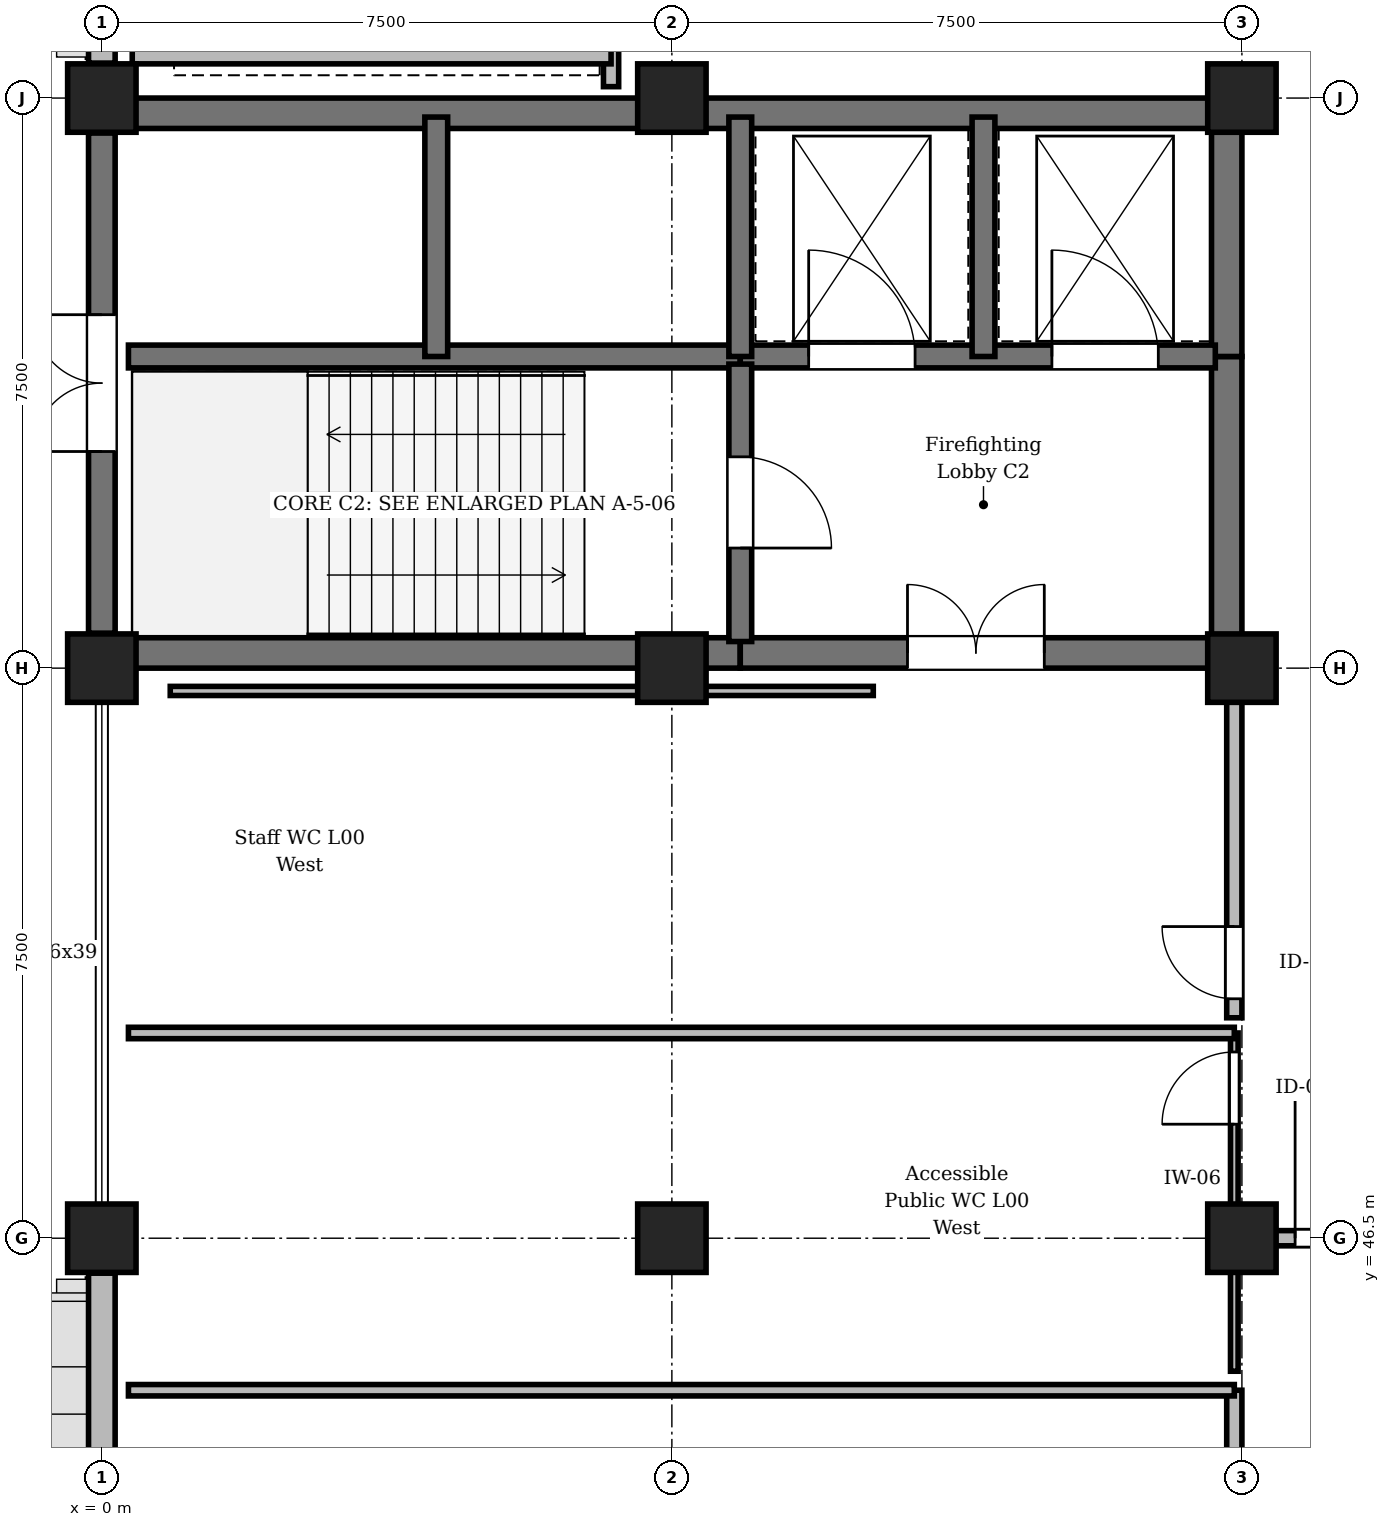
"""IFC4 building model, lengths in metres.
Left out: names, types, materials, properties, quantities, classifications, styles, units other than length and angle.
Written with IfcOpenShell. Run it as: python <this file> out.ifc"""

import sys

from ifc_helpers import new_model, si_unit, direction, frame, frame_2d, origin, origin_2d, place, context, subcontext, project, spatial, rectangle, circle, extrude, element, fill, save


model = new_model("IFC4")
c1 = context("Model", 3, precision=1e-05, world=origin(), true_north=direction((0.0, 1.0)))
c2 = subcontext(c1, "Body", "Model", "MODEL_VIEW")
j1 = project(units=[si_unit("LENGTHUNIT", "METRE"), si_unit("PLANEANGLEUNIT", "RADIAN")], contexts=[c1])
p1 = place(None, origin())
s1 = spatial("IfcSite", under=j1, at=p1, CompositionType="ELEMENT")
p2 = place(p1, origin())
s2 = spatial("IfcBuilding", under=s1, at=p2, CompositionType="ELEMENT")
p3 = place(p2, origin())
s3 = spatial("IfcBuildingStorey", under=s2, at=p3, CompositionType="ELEMENT", Elevation=0.0)
p4 = place(p3, frame((0.0, 46.5, 0.0), z_axis=(0.0, 0.0, 1.0), x_axis=(1.0, 0.0, 0.0)))
e1 = element("IfcColumn", 1, at=p4, inside=s3, PredefinedType="COLUMN", context=c2, shape_type="SweptSolid", body=[
    extrude(circle(Radius=0.45, at=origin_2d()), origin(), (0.0, 0.0, 1.0), 4.8),
])
for number, where, z_axis, x_axis in (
    (2, (0.0, 54.0, 0.0), (0.0, 0.0, 1.0), (1.0, 0.0, 0.0)),
    (3, (0.0, 61.5, 0.0), (0.0, 0.0, 1.0), (1.0, 0.0, 0.0)),
    (4, (7.5, 46.5, 0.0), (0.0, 0.0, 1.0), (1.0, 0.0, 0.0)),
    (5, (7.5, 54.0, 0.0), (0.0, 0.0, 1.0), (1.0, 0.0, 0.0)),
):
    element("IfcColumn", number, at=place(p3, frame(where, z_axis=z_axis, x_axis=x_axis)), inside=s3, PredefinedType="COLUMN", context=c2, shape_type="SweptSolid", body=[
        extrude(rectangle(XDim=0.9, YDim=0.9, at=origin_2d()), origin(), (0.0, 0.0, 1.0), 4.8),
    ])
p5 = place(p3, frame((7.5, 61.5, 0.0), z_axis=(0.0, 0.0, 1.0), x_axis=(1.0, 0.0, 0.0)))
e6 = element("IfcColumn", 6, at=p5, inside=s3, PredefinedType="COLUMN", context=c2, shape_type="SweptSolid", body=[
    extrude(circle(Radius=0.45, at=origin_2d()), origin(), (0.0, 0.0, 1.0), 4.8),
])
p6 = place(p3, frame((15.0, 46.5, 0.0), z_axis=(0.0, 0.0, 1.0), x_axis=(1.0, 0.0, 0.0)))
e7 = element("IfcColumn", 7, at=p6, inside=s3, PredefinedType="COLUMN", context=c2, shape_type="SweptSolid", body=[
    extrude(rectangle(XDim=0.9, YDim=0.9, at=origin_2d()), origin(), (0.0, 0.0, 1.0), 4.8),
])
p7 = place(p3, frame((15.0, 54.0, 0.0), z_axis=(0.0, 0.0, 1.0), x_axis=(1.0, 0.0, 0.0)))
e8 = element("IfcColumn", 8, at=p7, inside=s3, PredefinedType="COLUMN", context=c2, shape_type="SweptSolid", body=[
    extrude(circle(Radius=0.45, at=origin_2d()), origin(), (0.0, 0.0, 1.0), 4.8),
])
p8 = place(p3, frame((15.0, 61.5, 0.0), z_axis=(0.0, 0.0, 1.0), x_axis=(1.0, 0.0, 0.0)))
e9 = element("IfcColumn", 9, at=p8, inside=s3, PredefinedType="COLUMN", context=c2, shape_type="SweptSolid", body=[
    extrude(rectangle(XDim=0.9, YDim=0.9, at=origin_2d()), origin(), (0.0, 0.0, 1.0), 4.8),
])
p9 = place(p3, frame((0.0, 39.46, 0.0), z_axis=(0.0, 0.0, 1.0), x_axis=(0.0, 1.0, 0.0)))
e10 = element("IfcWall", 10, at=p9, inside=s3, PredefinedType="STANDARD", context=c2, shape_type="SweptSolid", body=[
    extrude(rectangle(XDim=6.58, YDim=0.35, at=frame_2d((3.29, 0.0))), origin(), (0.0, 0.0, 1.0), 3.9),
])
p10 = place(p9, frame((2.54, 0.0, 0.9)))
e11 = element("IfcOpeningElement", 11, at=p10, cuts=e10, PredefinedType="OPENING", context=c2, shape_type="SweptSolid", body=[
    extrude(rectangle(XDim=1.5, YDim=2.1, at=frame_2d((0.75, 1.05))), frame((0.0, 0.185, 0.0), z_axis=(0.0, -1.0, 0.0), x_axis=(1.0, 0.0, 0.0)), (0.0, 0.0, 1.0), 0.37),
])
p11 = place(p3, frame((0.0, 54.46, 0.0), z_axis=(0.0, 0.0, 1.0), x_axis=(0.0, 1.0, 0.0)))
e12 = element("IfcWall", 12, at=p11, inside=s3, PredefinedType="SHEAR", context=c2, shape_type="SweptSolid", body=[
    extrude(rectangle(XDim=6.58, YDim=0.35, at=frame_2d((3.29, 0.0))), origin(), (0.0, 0.0, 1.0), 4.5),
])
p12 = place(p11, frame((2.39, 0.0, 0.0)))
e13 = element("IfcOpeningElement", 13, at=p12, cuts=e12, PredefinedType="OPENING", context=c2, shape_type="SweptSolid", body=[
    extrude(rectangle(XDim=1.8, YDim=2.5, at=frame_2d((0.9, 1.25))), frame((0.0, 0.185, 0.0), z_axis=(0.0, -1.0, 0.0), x_axis=(1.0, 0.0, 0.0)), (0.0, 0.0, 1.0), 0.37),
])
p13 = place(p3, frame((0.0, 61.96, 0.0), z_axis=(0.0, 0.0, 1.0), x_axis=(0.0, 1.0, 0.0)))
e14 = element("IfcWall", 14, at=p13, inside=s3, PredefinedType="STANDARD", context=c2, shape_type="SweptSolid", body=[
    extrude(rectangle(XDim=6.58, YDim=0.35, at=frame_2d((3.29, 0.0))), origin(), (0.0, 0.0, 1.0), 3.9),
])
p14 = place(p13, frame((2.09, 0.0, 0.9)))
e15 = element("IfcOpeningElement", 15, at=p14, cuts=e14, PredefinedType="OPENING", context=c2, shape_type="SweptSolid", body=[
    extrude(rectangle(XDim=2.4, YDim=2.1, at=frame_2d((1.2, 1.05))), frame((0.0, 0.185, 0.0), z_axis=(0.0, -1.0, 0.0), x_axis=(1.0, 0.0, 0.0)), (0.0, 0.0, 1.0), 0.37),
])
p15 = place(p3, frame((0.35, 54.2, 0.0), z_axis=(0.0, 0.0, 1.0), x_axis=(1.0, 0.0, 0.0)))
e16 = element("IfcWall", 16, at=p15, inside=s3, PredefinedType="SHEAR", context=c2, shape_type="SweptSolid", body=[
    extrude(rectangle(XDim=8.05, YDim=0.4, at=frame_2d((4.025, 0.0))), origin(), (0.0, 0.0, 1.0), 4.5),
])
p16 = place(p3, frame((8.4, 54.2, 0.0), z_axis=(0.0, 0.0, 1.0), x_axis=(1.0, 0.0, 0.0)))
e17 = element("IfcWall", 17, at=p16, inside=s3, PredefinedType="SHEAR", context=c2, shape_type="SweptSolid", body=[
    extrude(rectangle(XDim=6.25, YDim=0.4, at=frame_2d((3.125, 0.0))), origin(), (0.0, 0.0, 1.0), 4.5),
])
p17 = place(p16, frame((2.2, 0.0, 0.0)))
e18 = element("IfcOpeningElement", 18, at=p17, cuts=e17, PredefinedType="OPENING", context=c2, shape_type="SweptSolid", body=[
    extrude(rectangle(XDim=1.8, YDim=2.25, at=frame_2d((0.9, 1.125))), frame((0.0, 0.21, 0.0), z_axis=(0.0, -1.0, 0.0), x_axis=(1.0, 0.0, 0.0)), (0.0, 0.0, 1.0), 0.42),
])
p18 = place(p3, frame((0.35, 61.3, 0.0), z_axis=(0.0, 0.0, 1.0), x_axis=(1.0, 0.0, 0.0)))
e19 = element("IfcWall", 19, at=p18, inside=s3, PredefinedType="SHEAR", context=c2, shape_type="SweptSolid", body=[
    extrude(rectangle(XDim=14.3, YDim=0.4, at=frame_2d((7.15, 0.0))), origin(), (0.0, 0.0, 1.0), 4.5),
])
p19 = place(p3, frame((14.8, 54.35, 0.0), z_axis=(0.0, 0.0, 1.0), x_axis=(0.0, 1.0, 0.0)))
e20 = element("IfcWall", 20, at=p19, inside=s3, PredefinedType="SHEAR", context=c2, shape_type="SweptSolid", body=[
    extrude(rectangle(XDim=3.75, YDim=0.4, at=frame_2d((1.875, 0.0))), origin(), (0.0, 0.0, 1.0), 4.5),
])
p20 = place(p3, frame((14.8, 58.1, 0.0), z_axis=(0.0, 0.0, 1.0), x_axis=(0.0, 1.0, 0.0)))
e21 = element("IfcWall", 21, at=p20, inside=s3, PredefinedType="SHEAR", context=c2, shape_type="SweptSolid", body=[
    extrude(rectangle(XDim=3.05, YDim=0.4, at=frame_2d((1.525, 0.0))), origin(), (0.0, 0.0, 1.0), 4.5),
])
p21 = place(p3, frame((0.35, 58.1, 0.0), z_axis=(0.0, 0.0, 1.0), x_axis=(1.0, 0.0, 0.0)))
e22 = element("IfcWall", 22, at=p21, inside=s3, PredefinedType="SHEAR", context=c2, shape_type="SweptSolid", body=[
    extrude(rectangle(XDim=8.05, YDim=0.3, at=frame_2d((4.025, 0.0))), origin(), (0.0, 0.0, 1.0), 4.5),
])
p22 = place(p3, frame((8.4, 58.1, 0.0), z_axis=(0.0, 0.0, 1.0), x_axis=(1.0, 0.0, 0.0)))
e23 = element("IfcWall", 23, at=p22, inside=s3, PredefinedType="SHEAR", context=c2, shape_type="SweptSolid", body=[
    extrude(rectangle(XDim=6.25, YDim=0.3, at=frame_2d((3.125, 0.0))), origin(), (0.0, 0.0, 1.0), 4.5),
])
p23 = place(p22, frame((0.9, 0.0, 0.0)))
e24 = element("IfcOpeningElement", 24, at=p23, cuts=e23, PredefinedType="OPENING", context=c2, shape_type="SweptSolid", body=[
    extrude(rectangle(XDim=1.4, YDim=2.25, at=frame_2d((0.7, 1.125))), frame((0.0, 0.16, 0.0), z_axis=(0.0, -1.0, 0.0), x_axis=(1.0, 0.0, 0.0)), (0.0, 0.0, 1.0), 0.32),
])
p24 = place(p22, frame((4.1, 0.0, 0.0)))
e25 = element("IfcOpeningElement", 25, at=p24, cuts=e23, PredefinedType="OPENING", context=c2, shape_type="SweptSolid", body=[
    extrude(rectangle(XDim=1.4, YDim=2.25, at=frame_2d((0.7, 1.125))), frame((0.0, 0.16, 0.0), z_axis=(0.0, -1.0, 0.0), x_axis=(1.0, 0.0, 0.0)), (0.0, 0.0, 1.0), 0.32),
])
p25 = place(p3, frame((8.4, 58.0, 0.0), z_axis=(0.0, 0.0, 1.0), x_axis=(0.0, -1.0, 0.0)))
e26 = element("IfcWall", 26, at=p25, inside=s3, PredefinedType="SHEAR", context=c2, shape_type="SweptSolid", body=[
    extrude(rectangle(XDim=3.65, YDim=0.3, at=frame_2d((1.825, 0.0))), origin(), (0.0, 0.0, 1.0), 4.5),
])
p26 = place(p25, frame((1.22, 0.0, 0.0)))
e27 = element("IfcOpeningElement", 27, at=p26, cuts=e26, PredefinedType="OPENING", context=c2, shape_type="SweptSolid", body=[
    extrude(rectangle(XDim=1.2, YDim=2.25, at=frame_2d((0.6, 1.125))), frame((0.0, 0.16, 0.0), z_axis=(0.0, -1.0, 0.0), x_axis=(1.0, 0.0, 0.0)), (0.0, 0.0, 1.0), 0.32),
])
for number, where, z_axis, x_axis in (
    (28, (4.4, 58.1, 0.0), (0.0, 0.0, 1.0), (0.0, 1.0, 0.0)),
    (29, (8.4, 58.1, 0.0), (0.0, 0.0, 1.0), (0.0, 1.0, 0.0)),
    (30, (11.6, 58.1, 0.0), (0.0, 0.0, 1.0), (0.0, 1.0, 0.0)),
):
    element("IfcWall", number, at=place(p3, frame(where, z_axis=z_axis, x_axis=x_axis)), inside=s3, PredefinedType="SHEAR", context=c2, shape_type="SweptSolid", body=[
        extrude(rectangle(XDim=3.15, YDim=0.3, at=frame_2d((1.575, 0.0))), origin(), (0.0, 0.0, 1.0), 4.5),
    ])
p27 = place(p3, frame((6.7, 61.65, 0.0), z_axis=(0.0, 0.0, 1.0), x_axis=(0.0, 1.0, 0.0)))
e31 = element("IfcWall", 31, at=p27, inside=s3, PredefinedType="STANDARD", context=c2, shape_type="SweptSolid", body=[
    extrude(rectangle(XDim=31.0, YDim=0.2, at=frame_2d((15.5, 0.0))), origin(), (0.0, 0.0, 1.0), 4.44),
])
p28 = place(p3, frame((0.4, 62.05, 0.0), z_axis=(0.0, 0.0, 1.0), x_axis=(1.0, 0.0, 0.0)))
e32 = element("IfcWall", 32, at=p28, inside=s3, PredefinedType="STANDARD", context=c2, shape_type="SweptSolid", body=[
    extrude(rectangle(XDim=6.3, YDim=0.2, at=frame_2d((3.15, 0.0))), origin(), (0.0, 0.0, 1.0), 4.44),
])
p29 = place(p3, frame((14.9, 34.75, 0.0), z_axis=(0.0, 0.0, 1.0), x_axis=(0.0, 1.0, 0.0)))
e33 = element("IfcWall", 33, at=p29, inside=s3, PredefinedType="STANDARD", context=c2, shape_type="SweptSolid", body=[
    extrude(rectangle(XDim=9.75, YDim=0.2, at=frame_2d((4.875, 0.0))), origin(), (0.0, 0.0, 1.0), 3.935),
])
p30 = place(p29, frame((7.63, 0.0, 0.0)))
e34 = element("IfcOpeningElement", 34, at=p30, cuts=e33, PredefinedType="OPENING", context=c2, shape_type="SweptSolid", body=[
    extrude(rectangle(XDim=1.05, YDim=2.2, at=frame_2d((0.525, 1.1))), frame((0.0, 0.11, 0.0), z_axis=(0.0, -1.0, 0.0), x_axis=(1.0, 0.0, 0.0)), (0.0, 0.0, 1.0), 0.22),
])
p31 = place(p3, frame((14.9, 44.75, 0.0), z_axis=(0.0, 0.0, 1.0), x_axis=(0.0, 1.0, 0.0)))
e35 = element("IfcWall", 35, at=p31, inside=s3, PredefinedType="PARTITIONING", context=c2, shape_type="SweptSolid", body=[
    extrude(rectangle(XDim=4.45, YDim=0.1, at=frame_2d((2.225, 0.0))), origin(), (0.0, 0.0, 1.0), 3.935),
])
p32 = place(p31, frame((3.25, 0.0, 0.0)))
e36 = element("IfcOpeningElement", 36, at=p32, cuts=e35, PredefinedType="OPENING", context=c2, shape_type="SweptSolid", body=[
    extrude(rectangle(XDim=0.95, YDim=2.15, at=frame_2d((0.475, 1.075))), frame((0.0, 0.06, 0.0), z_axis=(0.0, -1.0, 0.0), x_axis=(1.0, 0.0, 0.0)), (0.0, 0.0, 1.0), 0.12),
])
p33 = place(p3, frame((14.9, 49.4, 0.0), z_axis=(0.0, 0.0, 1.0), x_axis=(0.0, 1.0, 0.0)))
e37 = element("IfcWall", 37, at=p33, inside=s3, PredefinedType="STANDARD", context=c2, shape_type="SweptSolid", body=[
    extrude(rectangle(XDim=4.3, YDim=0.2, at=frame_2d((2.15, 0.0))), origin(), (0.0, 0.0, 1.0), 3.935),
])
p34 = place(p33, frame((0.25, 0.0, 0.0)))
e38 = element("IfcOpeningElement", 38, at=p34, cuts=e37, PredefinedType="OPENING", context=c2, shape_type="SweptSolid", body=[
    extrude(rectangle(XDim=0.95, YDim=2.15, at=frame_2d((0.475, 1.075))), frame((0.0, 0.11, 0.0), z_axis=(0.0, -1.0, 0.0), x_axis=(1.0, 0.0, 0.0)), (0.0, 0.0, 1.0), 0.22),
])
for number, where, z_axis, x_axis in (
    (39, (0.35, 44.5, 0.0), (0.0, 0.0, 1.0), (1.0, 0.0, 0.0)),
    (40, (0.35, 49.2, 0.0), (0.0, 0.0, 1.0), (1.0, 0.0, 0.0)),
):
    element("IfcWall", number, at=place(p3, frame(where, z_axis=z_axis, x_axis=x_axis)), inside=s3, PredefinedType="PARTITIONING", context=c2, shape_type="SweptSolid", body=[
        extrude(rectangle(XDim=14.55, YDim=0.15, at=frame_2d((7.275, 0.0))), origin(), (0.0, 0.0, 1.0), 4.485),
    ])
p35 = place(p3, frame((0.9, 53.7, 0.0), z_axis=(0.0, 0.0, 1.0), x_axis=(1.0, 0.0, 0.0)))
e41 = element("IfcWall", 41, at=p35, inside=s3, PredefinedType="PARTITIONING", context=c2, shape_type="SweptSolid", body=[
    extrude(rectangle(XDim=9.25, YDim=0.12, at=frame_2d((4.625, 0.0))), origin(), (0.0, 0.0, 1.0), 3.835),
])
p36 = place(p3, frame((15.2, 46.5, 0.0), z_axis=(0.0, 0.0, 1.0), x_axis=(1.0, 0.0, 0.0)))
e42 = element("IfcWall", 42, at=p36, inside=s3, PredefinedType="STANDARD", context=c2, shape_type="SweptSolid", body=[
    extrude(rectangle(XDim=3.0, YDim=0.2, at=frame_2d((1.5, 0.0))), origin(), (0.0, 0.0, 1.0), 3.835),
])
p37 = place(p36, frame((0.5, 0.0, 0.0)))
e43 = element("IfcOpeningElement", 43, at=p37, cuts=e42, PredefinedType="OPENING", context=c2, shape_type="SweptSolid", body=[
    extrude(rectangle(XDim=2.0, YDim=2.3, at=frame_2d((1.0, 1.15))), frame((0.0, 0.11, 0.0), z_axis=(0.0, -1.0, 0.0), x_axis=(1.0, 0.0, 0.0)), (0.0, 0.0, 1.0), 0.22),
])
p38 = place(p12, origin())
e44 = element("IfcDoor", 44, at=p38, inside=s3, OperationType="DOUBLE_DOOR_SINGLE_SWING", PredefinedType="DOOR", context=c2, shape_type="SweptSolid", body=[
    extrude(rectangle(XDim=1.8, YDim=2.5, at=frame_2d((0.9, 1.25))), frame((0.0, 0.025, 0.0), z_axis=(0.0, -1.0, 0.0), x_axis=(1.0, 0.0, 0.0)), (0.0, 0.0, 1.0), 0.05),
])
fill(e13, e44)
p39 = place(p17, origin())
e45 = element("IfcDoor", 45, at=p39, inside=s3, OperationType="DOUBLE_DOOR_SINGLE_SWING", PredefinedType="DOOR", context=c2, shape_type="SweptSolid", body=[
    extrude(rectangle(XDim=1.8, YDim=2.25, at=frame_2d((0.9, 1.125))), frame((0.0, 0.025, 0.0), z_axis=(0.0, -1.0, 0.0), x_axis=(1.0, 0.0, 0.0)), (0.0, 0.0, 1.0), 0.05),
])
fill(e18, e45)
p40 = place(p23, origin())
e46 = element("IfcDoor", 46, at=p40, inside=s3, OperationType="DOUBLE_DOOR_SLIDING", PredefinedType="DOOR", context=c2, shape_type="SweptSolid", body=[
    extrude(rectangle(XDim=1.4, YDim=2.25, at=frame_2d((0.7, 1.125))), frame((0.0, 0.025, 0.0), z_axis=(0.0, -1.0, 0.0), x_axis=(1.0, 0.0, 0.0)), (0.0, 0.0, 1.0), 0.05),
])
fill(e24, e46)
p41 = place(p24, origin())
e47 = element("IfcDoor", 47, at=p41, inside=s3, OperationType="DOUBLE_DOOR_SLIDING", PredefinedType="DOOR", context=c2, shape_type="SweptSolid", body=[
    extrude(rectangle(XDim=1.4, YDim=2.25, at=frame_2d((0.7, 1.125))), frame((0.0, 0.025, 0.0), z_axis=(0.0, -1.0, 0.0), x_axis=(1.0, 0.0, 0.0)), (0.0, 0.0, 1.0), 0.05),
])
fill(e25, e47)
p42 = place(p26, origin())
e48 = element("IfcDoor", 48, at=p42, inside=s3, OperationType="SINGLE_SWING_RIGHT", PredefinedType="DOOR", context=c2, shape_type="SweptSolid", body=[
    extrude(rectangle(XDim=1.2, YDim=2.25, at=frame_2d((0.6, 1.125))), frame((0.0, 0.025, 0.0), z_axis=(0.0, -1.0, 0.0), x_axis=(1.0, 0.0, 0.0)), (0.0, 0.0, 1.0), 0.05),
])
fill(e27, e48)
p43 = place(p32, origin())
e49 = element("IfcDoor", 49, at=p43, inside=s3, OperationType="SINGLE_SWING_LEFT", PredefinedType="DOOR", context=c2, shape_type="SweptSolid", body=[
    extrude(rectangle(XDim=0.95, YDim=2.15, at=frame_2d((0.475, 1.075))), frame((0.0, 0.025, 0.0), z_axis=(0.0, -1.0, 0.0), x_axis=(1.0, 0.0, 0.0)), (0.0, 0.0, 1.0), 0.05),
])
fill(e36, e49)
p44 = place(p34, origin())
e50 = element("IfcDoor", 50, at=p44, inside=s3, OperationType="SINGLE_SWING_RIGHT", PredefinedType="DOOR", context=c2, shape_type="SweptSolid", body=[
    extrude(rectangle(XDim=0.95, YDim=2.15, at=frame_2d((0.475, 1.075))), frame((0.0, 0.025, 0.0), z_axis=(0.0, -1.0, 0.0), x_axis=(1.0, 0.0, 0.0)), (0.0, 0.0, 1.0), 0.05),
])
fill(e38, e50)
p45 = place(p37, origin())
e51 = element("IfcDoor", 51, at=p45, inside=s3, OperationType="DOUBLE_DOOR_SINGLE_SWING", PredefinedType="DOOR", context=c2, shape_type="SweptSolid", body=[
    extrude(rectangle(XDim=2.0, YDim=2.3, at=frame_2d((1.0, 1.15))), frame((0.0, 0.025, 0.0), z_axis=(0.0, -1.0, 0.0), x_axis=(1.0, 0.0, 0.0)), (0.0, 0.0, 1.0), 0.05),
])
fill(e43, e51)
save(model, sys.argv[1])
